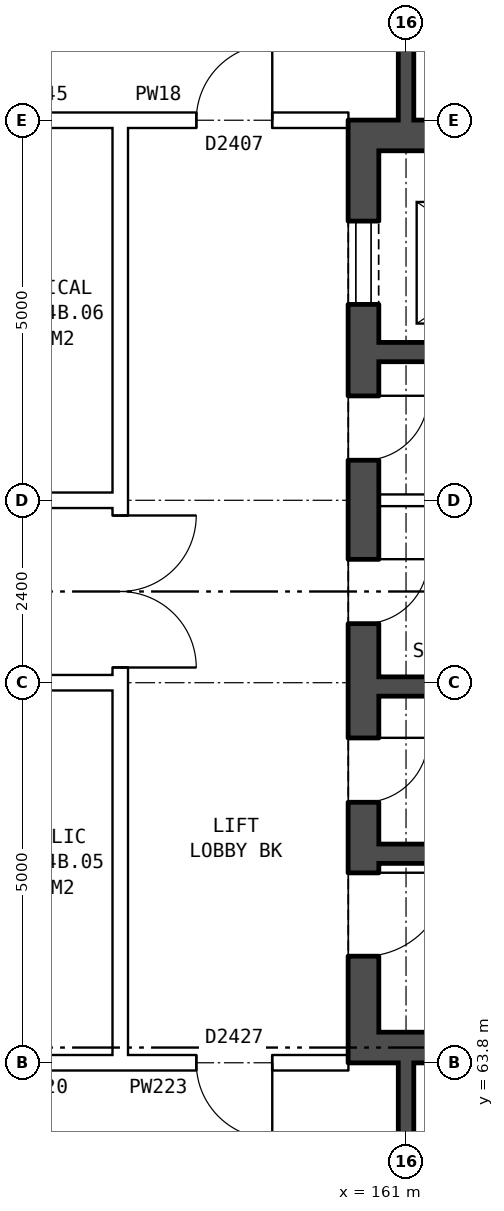
"""IFC4 building model, lengths in metres.
Left out: names, types, materials, properties, quantities, classifications, styles, units other than length and angle.
Written with IfcOpenShell. Run it as: python <this file> out.ifc"""

import sys

from ifc_helpers import new_model, si_unit, direction, frame, frame_2d, origin, place, context, subcontext, project, spatial, rectangle, extrude, element, fill, save


model = new_model("IFC4")
c1 = context("Model", 3, precision=1e-05, world=origin(), true_north=direction((0.0, 1.0)))
c2 = subcontext(c1, "Body", "Model", "MODEL_VIEW")
j1 = project(units=[si_unit("LENGTHUNIT", "METRE"), si_unit("PLANEANGLEUNIT", "RADIAN")], contexts=[c1])
p1 = place(None, origin())
s1 = spatial("IfcSite", under=j1, at=p1, CompositionType="ELEMENT")
p2 = place(p1, origin())
s2 = spatial("IfcBuilding", under=s1, at=p2, CompositionType="ELEMENT")
p3 = place(p2, frame((0.0, 0.0, 227.6)))
s3 = spatial("IfcBuildingStorey", under=s2, at=p3, CompositionType="ELEMENT", Elevation=227.6)
p4 = place(p3, frame((160.44, 76.2, 0.0), z_axis=(0.0, 0.0, 1.0), x_axis=(0.0, -1.0, 0.0)))
e1 = element("IfcWall", 1, at=p4, inside=s3, PredefinedType="SHEAR", context=c2, shape_type="SweptSolid", body=[
    extrude(rectangle(XDim=12.4, YDim=0.4, at=frame_2d((6.2, 0.0))), origin(), (0.0, 0.0, 1.0), 2.85),
])
p5 = place(p4, frame((1.325, 0.0, 0.0)))
e2 = element("IfcOpeningElement", 2, at=p5, cuts=e1, PredefinedType="OPENING", context=c2, shape_type="SweptSolid", body=[
    extrude(rectangle(XDim=1.1, YDim=2.1, at=frame_2d((0.55, 1.05))), frame((0.0, 0.21, 0.0), z_axis=(0.0, -1.0, 0.0), x_axis=(1.0, 0.0, 0.0)), (0.0, 0.0, 1.0), 0.42),
])
p6 = place(p4, frame((3.625, 0.0, 0.0)))
e3 = element("IfcOpeningElement", 3, at=p6, cuts=e1, PredefinedType="OPENING", context=c2, shape_type="SweptSolid", body=[
    extrude(rectangle(XDim=0.85, YDim=2.1, at=frame_2d((0.425, 1.05))), frame((0.0, 0.21, 0.0), z_axis=(0.0, -1.0, 0.0), x_axis=(1.0, 0.0, 0.0)), (0.0, 0.0, 1.0), 0.42),
])
p7 = place(p4, frame((5.775, 0.0, 0.0)))
e4 = element("IfcOpeningElement", 4, at=p7, cuts=e1, PredefinedType="OPENING", context=c2, shape_type="SweptSolid", body=[
    extrude(rectangle(XDim=0.85, YDim=2.1, at=frame_2d((0.425, 1.05))), frame((0.0, 0.21, 0.0), z_axis=(0.0, -1.0, 0.0), x_axis=(1.0, 0.0, 0.0)), (0.0, 0.0, 1.0), 0.42),
])
p8 = place(p4, frame((9.9, 0.0, 0.0)))
e5 = element("IfcOpeningElement", 5, at=p8, cuts=e1, PredefinedType="OPENING", context=c2, shape_type="SweptSolid", body=[
    extrude(rectangle(XDim=1.1, YDim=2.1, at=frame_2d((0.55, 1.05))), frame((0.0, 0.21, 0.0), z_axis=(0.0, -1.0, 0.0), x_axis=(1.0, 0.0, 0.0)), (0.0, 0.0, 1.0), 0.42),
])
p9 = place(p4, frame((8.125, 0.0, 0.0)))
e6 = element("IfcOpeningElement", 6, at=p9, cuts=e1, PredefinedType="OPENING", context=c2, shape_type="SweptSolid", body=[
    extrude(rectangle(XDim=0.85, YDim=2.1, at=frame_2d((0.425, 1.05))), frame((0.0, 0.21, 0.0), z_axis=(0.0, -1.0, 0.0), x_axis=(1.0, 0.0, 0.0)), (0.0, 0.0, 1.0), 0.42),
])
for number, where, z_axis, x_axis in (
    (7, (160.64, 76.0, 0.0), (0.0, 0.0, 1.0), (1.0, 0.0, 0.0)),
    (8, (160.64, 64.0, 0.0), (0.0, 0.0, 1.0), (1.0, 0.0, 0.0)),
):
    element("IfcWall", number, at=place(p3, frame(where, z_axis=z_axis, x_axis=x_axis)), inside=s3, PredefinedType="SHEAR", context=c2, shape_type="SweptSolid", body=[
        extrude(rectangle(XDim=7.6, YDim=0.4, at=frame_2d((3.8, 0.0))), origin(), (0.0, 0.0, 1.0), 2.85),
    ])
p10 = place(p3, frame((160.64, 73.15, 0.0), z_axis=(0.0, 0.0, 1.0), x_axis=(1.0, 0.0, 0.0)))
e9 = element("IfcWall", 9, at=p10, inside=s3, PredefinedType="SHEAR", context=c2, shape_type="SweptSolid", body=[
    extrude(rectangle(XDim=4.775, YDim=0.25, at=frame_2d((2.388, 0.0))), origin(), (0.0, 0.0, 1.0), 2.85),
])
p11 = place(p3, frame((160.64, 71.2, 0.0), z_axis=(0.0, 0.0, 1.0), x_axis=(1.0, 0.0, 0.0)))
e10 = element("IfcWall", 10, at=p11, inside=s3, PredefinedType="PARTITIONING", context=c2, shape_type="SweptSolid", body=[
    extrude(rectangle(XDim=2.525, YDim=0.15, at=frame_2d((1.263, 0.0))), origin(), (0.0, 0.0, 1.0), 2.85),
])
p12 = place(p3, frame((160.64, 68.75, 0.0), z_axis=(0.0, 0.0, 1.0), x_axis=(1.0, 0.0, 0.0)))
e11 = element("IfcWall", 11, at=p12, inside=s3, PredefinedType="SHEAR", context=c2, shape_type="SweptSolid", body=[
    extrude(rectangle(XDim=7.6, YDim=0.25, at=frame_2d((3.8, 0.0))), origin(), (0.0, 0.0, 1.0), 2.85),
])
p13 = place(p12, frame((5.175, 0.0, 0.0)))
e12 = element("IfcOpeningElement", 12, at=p13, cuts=e11, PredefinedType="OPENING", context=c2, shape_type="SweptSolid", body=[
    extrude(rectangle(XDim=1.1, YDim=2.1, at=frame_2d((0.55, 1.05))), frame((0.0, 0.135, 0.0), z_axis=(0.0, -1.0, 0.0), x_axis=(1.0, 0.0, 0.0)), (0.0, 0.0, 1.0), 0.27),
])
p14 = place(p12, frame((3.35, 0.0, 0.0)))
e13 = element("IfcOpeningElement", 13, at=p14, cuts=e11, PredefinedType="OPENING", context=c2, shape_type="SweptSolid", body=[
    extrude(rectangle(XDim=0.85, YDim=2.1, at=frame_2d((0.425, 1.05))), frame((0.0, 0.135, 0.0), z_axis=(0.0, -1.0, 0.0), x_axis=(1.0, 0.0, 0.0)), (0.0, 0.0, 1.0), 0.27),
])
p15 = place(p3, frame((160.64, 66.55, 0.0), z_axis=(0.0, 0.0, 1.0), x_axis=(1.0, 0.0, 0.0)))
e14 = element("IfcWall", 14, at=p15, inside=s3, PredefinedType="SHEAR", context=c2, shape_type="SweptSolid", body=[
    extrude(rectangle(XDim=2.525, YDim=0.25, at=frame_2d((1.263, 0.0))), origin(), (0.0, 0.0, 1.0), 2.85),
])
p16 = place(p3, frame((157.24, 63.9, 0.0), z_axis=(0.0, 0.0, 1.0), x_axis=(0.0, 1.0, 0.0)))
e15 = element("IfcWall", 15, at=p16, inside=s3, PredefinedType="PARTITIONING", context=c2, shape_type="SweptSolid", body=[
    extrude(rectangle(XDim=12.2, YDim=0.2, at=frame_2d((6.1, 0.0))), origin(), (0.0, 0.0, 1.0), 2.85),
])
p17 = place(p16, frame((5.1, 0.0, 0.0)))
e16 = element("IfcOpeningElement", 16, at=p17, cuts=e15, PredefinedType="OPENING", context=c2, shape_type="SweptSolid", body=[
    extrude(rectangle(XDim=2.0, YDim=2.1, at=frame_2d((1.0, 1.05))), frame((0.0, 0.11, 0.0), z_axis=(0.0, -1.0, 0.0), x_axis=(1.0, 0.0, 0.0)), (0.0, 0.0, 1.0), 0.22),
])
p18 = place(p3, frame((155.1, 63.8, 0.0), z_axis=(0.0, 0.0, 1.0), x_axis=(1.0, 0.0, 0.0)))
e17 = element("IfcWall", 17, at=p18, inside=s3, PredefinedType="PARTITIONING", context=c2, shape_type="SweptSolid", body=[
    extrude(rectangle(XDim=2.14, YDim=0.2, at=frame_2d((1.07, 0.0))), origin(), (0.0, 0.0, 1.0), 2.85),
])
p19 = place(p3, frame((157.24, 63.8, 0.0), z_axis=(0.0, 0.0, 1.0), x_axis=(1.0, 0.0, 0.0)))
e18 = element("IfcWall", 18, at=p19, inside=s3, PredefinedType="PARTITIONING", context=c2, shape_type="SweptSolid", body=[
    extrude(rectangle(XDim=3.0, YDim=0.2, at=frame_2d((1.5, 0.0))), origin(), (0.0, 0.0, 1.0), 2.85),
])
p20 = place(p19, frame((1.0, 0.0, 0.0)))
e19 = element("IfcOpeningElement", 19, at=p20, cuts=e18, PredefinedType="OPENING", context=c2, shape_type="SweptSolid", body=[
    extrude(rectangle(XDim=1.0, YDim=2.1, at=frame_2d((0.5, 1.05))), frame((0.0, 0.11, 0.0), z_axis=(0.0, -1.0, 0.0), x_axis=(1.0, 0.0, 0.0)), (0.0, 0.0, 1.0), 0.22),
])
p21 = place(p3, frame((142.76, 68.8, 0.0), z_axis=(0.0, 0.0, 1.0), x_axis=(1.0, 0.0, 0.0)))
e20 = element("IfcWall", 20, at=p21, inside=s3, PredefinedType="PARTITIONING", context=c2, shape_type="SweptSolid", body=[
    extrude(rectangle(XDim=14.48, YDim=0.2, at=frame_2d((7.24, 0.0))), origin(), (0.0, 0.0, 1.0), 2.85),
])
p22 = place(p21, frame((1.12, 0.0, 0.0)))
e21 = element("IfcOpeningElement", 21, at=p22, cuts=e20, PredefinedType="OPENING", context=c2, shape_type="SweptSolid", body=[
    extrude(rectangle(XDim=1.0, YDim=2.1, at=frame_2d((0.5, 1.05))), frame((0.0, 0.11, 0.0), z_axis=(0.0, -1.0, 0.0), x_axis=(1.0, 0.0, 0.0)), (0.0, 0.0, 1.0), 0.22),
])
p23 = place(p21, frame((10.24, 0.0, 0.0)))
e22 = element("IfcOpeningElement", 22, at=p23, cuts=e20, PredefinedType="OPENING", context=c2, shape_type="SweptSolid", body=[
    extrude(rectangle(XDim=1.0, YDim=2.1, at=frame_2d((0.5, 1.05))), frame((0.0, 0.11, 0.0), z_axis=(0.0, -1.0, 0.0), x_axis=(1.0, 0.0, 0.0)), (0.0, 0.0, 1.0), 0.22),
])
p24 = place(p3, frame((142.76, 71.2, 0.0), z_axis=(0.0, 0.0, 1.0), x_axis=(1.0, 0.0, 0.0)))
e23 = element("IfcWall", 23, at=p24, inside=s3, PredefinedType="PARTITIONING", context=c2, shape_type="SweptSolid", body=[
    extrude(rectangle(XDim=14.48, YDim=0.2, at=frame_2d((7.24, 0.0))), origin(), (0.0, 0.0, 1.0), 2.85),
])
p25 = place(p24, frame((4.24, 0.0, 0.0)))
e24 = element("IfcOpeningElement", 24, at=p25, cuts=e23, PredefinedType="OPENING", context=c2, shape_type="SweptSolid", body=[
    extrude(rectangle(XDim=1.0, YDim=2.1, at=frame_2d((0.5, 1.05))), frame((0.0, 0.11, 0.0), z_axis=(0.0, -1.0, 0.0), x_axis=(1.0, 0.0, 0.0)), (0.0, 0.0, 1.0), 0.22),
])
p26 = place(p24, frame((10.24, 0.0, 0.0)))
e25 = element("IfcOpeningElement", 25, at=p26, cuts=e23, PredefinedType="OPENING", context=c2, shape_type="SweptSolid", body=[
    extrude(rectangle(XDim=1.0, YDim=2.1, at=frame_2d((0.5, 1.05))), frame((0.0, 0.11, 0.0), z_axis=(0.0, -1.0, 0.0), x_axis=(1.0, 0.0, 0.0)), (0.0, 0.0, 1.0), 0.22),
])
p27 = place(p3, frame((155.1, 76.2, 0.0), z_axis=(0.0, 0.0, 1.0), x_axis=(1.0, 0.0, 0.0)))
e26 = element("IfcWall", 26, at=p27, inside=s3, PredefinedType="PARTITIONING", context=c2, shape_type="SweptSolid", body=[
    extrude(rectangle(XDim=2.14, YDim=0.2, at=frame_2d((1.07, 0.0))), origin(), (0.0, 0.0, 1.0), 2.85),
])
p28 = place(p3, frame((157.24, 76.2, 0.0), z_axis=(0.0, 0.0, 1.0), x_axis=(1.0, 0.0, 0.0)))
e27 = element("IfcWall", 27, at=p28, inside=s3, PredefinedType="PARTITIONING", context=c2, shape_type="SweptSolid", body=[
    extrude(rectangle(XDim=3.0, YDim=0.2, at=frame_2d((1.5, 0.0))), origin(), (0.0, 0.0, 1.0), 2.85),
])
p29 = place(p28, frame((1.0, 0.0, 0.0)))
e28 = element("IfcOpeningElement", 28, at=p29, cuts=e27, PredefinedType="OPENING", context=c2, shape_type="SweptSolid", body=[
    extrude(rectangle(XDim=1.0, YDim=2.1, at=frame_2d((0.5, 1.05))), frame((0.0, 0.11, 0.0), z_axis=(0.0, -1.0, 0.0), x_axis=(1.0, 0.0, 0.0)), (0.0, 0.0, 1.0), 0.22),
])
p30 = place(p3, frame((161.0, 54.36, 0.0), z_axis=(0.0, 0.0, 1.0), x_axis=(0.0, 1.0, 0.0)))
e29 = element("IfcWall", 29, at=p30, inside=s3, PredefinedType="SOLIDWALL", context=c2, shape_type="SweptSolid", body=[
    extrude(rectangle(XDim=9.44, YDim=0.2, at=frame_2d((4.72, 0.0))), origin(), (0.0, 0.0, 1.0), 2.85),
])
p31 = place(p30, frame((1.37, 0.0, 0.0)))
e30 = element("IfcOpeningElement", 30, at=p31, cuts=e29, PredefinedType="OPENING", context=c2, shape_type="SweptSolid", body=[
    extrude(rectangle(XDim=0.9, YDim=2.1, at=frame_2d((0.45, 1.05))), frame((0.0, 0.11, 0.0), z_axis=(0.0, -1.0, 0.0), x_axis=(1.0, 0.0, 0.0)), (0.0, 0.0, 1.0), 0.22),
])
p32 = place(p30, frame((4.14, 0.0, 0.0)))
e31 = element("IfcOpeningElement", 31, at=p32, cuts=e29, PredefinedType="OPENING", context=c2, shape_type="SweptSolid", body=[
    extrude(rectangle(XDim=0.9, YDim=2.1, at=frame_2d((0.45, 1.05))), frame((0.0, 0.11, 0.0), z_axis=(0.0, -1.0, 0.0), x_axis=(1.0, 0.0, 0.0)), (0.0, 0.0, 1.0), 0.22),
])
p33 = place(p30, frame((7.59, 0.0, 0.0)))
e32 = element("IfcOpeningElement", 32, at=p33, cuts=e29, PredefinedType="OPENING", context=c2, shape_type="SweptSolid", body=[
    extrude(rectangle(XDim=0.9, YDim=2.1, at=frame_2d((0.45, 1.05))), frame((0.0, 0.11, 0.0), z_axis=(0.0, -1.0, 0.0), x_axis=(1.0, 0.0, 0.0)), (0.0, 0.0, 1.0), 0.22),
])
p34 = place(p3, frame((161.0, 76.2, 0.0), z_axis=(0.0, 0.0, 1.0), x_axis=(0.0, 1.0, 0.0)))
e33 = element("IfcWall", 33, at=p34, inside=s3, PredefinedType="SOLIDWALL", context=c2, shape_type="SweptSolid", body=[
    extrude(rectangle(XDim=9.44, YDim=0.2, at=frame_2d((4.72, 0.0))), origin(), (0.0, 0.0, 1.0), 2.85),
])
p35 = place(p34, frame((7.17, 0.0, 0.0)))
e34 = element("IfcOpeningElement", 34, at=p35, cuts=e33, PredefinedType="OPENING", context=c2, shape_type="SweptSolid", body=[
    extrude(rectangle(XDim=0.9, YDim=2.1, at=frame_2d((0.45, 1.05))), frame((0.0, 0.11, 0.0), z_axis=(0.0, -1.0, 0.0), x_axis=(1.0, 0.0, 0.0)), (0.0, 0.0, 1.0), 0.22),
])
p36 = place(p34, frame((4.1, 0.0, 0.0)))
e35 = element("IfcOpeningElement", 35, at=p36, cuts=e33, PredefinedType="OPENING", context=c2, shape_type="SweptSolid", body=[
    extrude(rectangle(XDim=0.9, YDim=2.1, at=frame_2d((0.45, 1.05))), frame((0.0, 0.11, 0.0), z_axis=(0.0, -1.0, 0.0), x_axis=(1.0, 0.0, 0.0)), (0.0, 0.0, 1.0), 0.22),
])
p37 = place(p34, frame((0.95, 0.0, 0.0)))
e36 = element("IfcOpeningElement", 36, at=p37, cuts=e33, PredefinedType="OPENING", context=c2, shape_type="SweptSolid", body=[
    extrude(rectangle(XDim=0.9, YDim=2.1, at=frame_2d((0.45, 1.05))), frame((0.0, 0.11, 0.0), z_axis=(0.0, -1.0, 0.0), x_axis=(1.0, 0.0, 0.0)), (0.0, 0.0, 1.0), 0.22),
])
p38 = place(p5, origin())
e37 = element("IfcDoor", 37, at=p38, inside=s3, OperationType="DOUBLE_DOOR_SLIDING", PredefinedType="DOOR", context=c2, shape_type="SweptSolid", body=[
    extrude(rectangle(XDim=1.1, YDim=2.1, at=frame_2d((0.55, 1.05))), frame((0.0, 0.185, 0.0), z_axis=(0.0, -1.0, 0.0), x_axis=(1.0, 0.0, 0.0)), (0.0, 0.0, 1.0), 0.05),
])
fill(e2, e37)
p39 = place(p6, origin())
e38 = element("IfcDoor", 38, at=p39, inside=s3, OperationType="SINGLE_SWING_LEFT", PredefinedType="DOOR", context=c2, shape_type="SweptSolid", body=[
    extrude(rectangle(XDim=0.85, YDim=2.1, at=frame_2d((0.425, 1.05))), frame((0.0, 0.185, 0.0), z_axis=(0.0, -1.0, 0.0), x_axis=(1.0, 0.0, 0.0)), (0.0, 0.0, 1.0), 0.05),
])
fill(e3, e38)
p40 = place(p7, origin())
e39 = element("IfcDoor", 39, at=p40, inside=s3, OperationType="SINGLE_SWING_LEFT", PredefinedType="DOOR", context=c2, shape_type="SweptSolid", body=[
    extrude(rectangle(XDim=0.85, YDim=2.1, at=frame_2d((0.425, 1.05))), frame((0.0, 0.185, 0.0), z_axis=(0.0, -1.0, 0.0), x_axis=(1.0, 0.0, 0.0)), (0.0, 0.0, 1.0), 0.05),
])
fill(e4, e39)
p41 = place(p8, origin())
e40 = element("IfcDoor", 40, at=p41, inside=s3, OperationType="SINGLE_SWING_LEFT", PredefinedType="DOOR", context=c2, shape_type="SweptSolid", body=[
    extrude(rectangle(XDim=1.1, YDim=2.1, at=frame_2d((0.55, 1.05))), frame((0.0, 0.185, 0.0), z_axis=(0.0, -1.0, 0.0), x_axis=(1.0, 0.0, 0.0)), (0.0, 0.0, 1.0), 0.05),
])
fill(e5, e40)
p42 = place(p9, origin())
e41 = element("IfcDoor", 41, at=p42, inside=s3, OperationType="SINGLE_SWING_LEFT", PredefinedType="DOOR", context=c2, shape_type="SweptSolid", body=[
    extrude(rectangle(XDim=0.85, YDim=2.1, at=frame_2d((0.425, 1.05))), frame((0.0, 0.185, 0.0), z_axis=(0.0, -1.0, 0.0), x_axis=(1.0, 0.0, 0.0)), (0.0, 0.0, 1.0), 0.05),
])
fill(e6, e41)
p43 = place(p17, frame((2.0, 0.0, 0.0), z_axis=(0.0, 0.0, 1.0), x_axis=(-1.0, 0.0, 0.0)))
e42 = element("IfcDoor", 42, at=p43, inside=s3, OperationType="DOUBLE_DOOR_SINGLE_SWING", PredefinedType="DOOR", context=c2, shape_type="SweptSolid", body=[
    extrude(rectangle(XDim=2.0, YDim=2.1, at=frame_2d((1.0, 1.05))), frame((0.0, 0.025, 0.0), z_axis=(0.0, -1.0, 0.0), x_axis=(1.0, 0.0, 0.0)), (0.0, 0.0, 1.0), 0.05),
])
fill(e16, e42)
p44 = place(p20, frame((1.0, 0.0, 0.0), z_axis=(0.0, 0.0, 1.0), x_axis=(-1.0, 0.0, 0.0)))
e43 = element("IfcDoor", 43, at=p44, inside=s3, OperationType="SINGLE_SWING_LEFT", PredefinedType="DOOR", context=c2, shape_type="SweptSolid", body=[
    extrude(rectangle(XDim=1.0, YDim=2.1, at=frame_2d((0.5, 1.05))), frame((0.0, 0.025, 0.0), z_axis=(0.0, -1.0, 0.0), x_axis=(1.0, 0.0, 0.0)), (0.0, 0.0, 1.0), 0.05),
])
fill(e19, e43)
p45 = place(p29, origin())
e44 = element("IfcDoor", 44, at=p45, inside=s3, OperationType="SINGLE_SWING_RIGHT", PredefinedType="DOOR", context=c2, shape_type="SweptSolid", body=[
    extrude(rectangle(XDim=1.0, YDim=2.1, at=frame_2d((0.5, 1.05))), frame((0.0, 0.025, 0.0), z_axis=(0.0, -1.0, 0.0), x_axis=(1.0, 0.0, 0.0)), (0.0, 0.0, 1.0), 0.05),
])
fill(e28, e44)
save(model, sys.argv[1])
